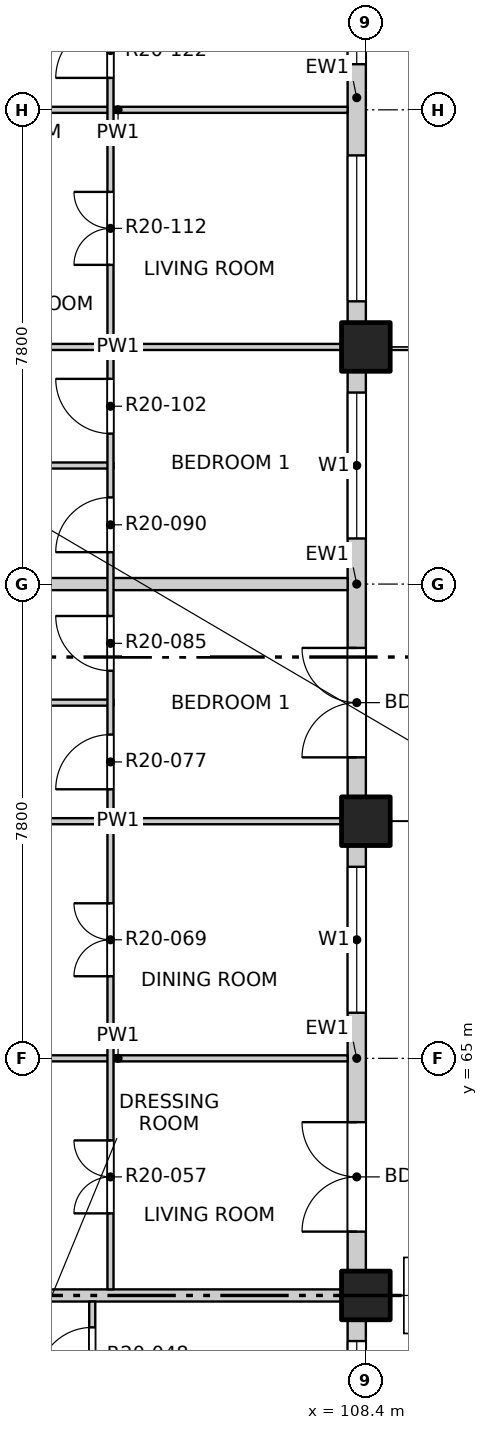
"""IFC4 building model, lengths in metres.
Left out: names, types, materials, properties, quantities, classifications, styles, units other than length and angle.
Written with IfcOpenShell. Run it as: python <this file> out.ifc"""

import sys

from ifc_helpers import new_model, si_unit, direction, frame, frame_2d, origin, origin_2d, place, context, subcontext, project, spatial, rectangle, extrude, element, fill, save


model = new_model("IFC4")
c1 = context("Model", 3, precision=1e-05, world=origin(), true_north=direction((0.0, 1.0)))
c2 = subcontext(c1, "Body", "Model", "MODEL_VIEW")
j1 = project(units=[si_unit("LENGTHUNIT", "METRE"), si_unit("PLANEANGLEUNIT", "RADIAN")], contexts=[c1])
p1 = place(None, origin())
s1 = spatial("IfcSite", under=j1, at=p1, CompositionType="ELEMENT")
p2 = place(p1, origin())
s2 = spatial("IfcBuilding", under=s1, at=p2, CompositionType="ELEMENT")
p3 = place(p2, frame((0.0, 0.0, 210.9)))
s3 = spatial("IfcBuildingStorey", under=s2, at=p3, CompositionType="ELEMENT", Elevation=210.9)
for number, where, z_axis, x_axis in (
    (1, (108.4, 61.1, -0.25), (0.0, 0.0, 1.0), (1.0, 0.0, 0.0)),
    (2, (108.4, 68.9, -0.25), (0.0, 0.0, 1.0), (1.0, 0.0, 0.0)),
    (3, (108.4, 76.7, -0.25), (0.0, 0.0, 1.0), (1.0, 0.0, 0.0)),
):
    element("IfcColumn", number, at=place(p3, frame(where, z_axis=z_axis, x_axis=x_axis)), inside=s3, PredefinedType="COLUMN", context=c2, shape_type="SweptSolid", body=[
        extrude(rectangle(XDim=0.8, YDim=0.8, at=origin_2d()), origin(), (0.0, 0.0, 1.0), 3.4),
    ])
p4 = place(p3, frame((108.25, 53.7, 0.0), z_axis=(0.0, 0.0, 1.0), x_axis=(0.0, 1.0, 0.0)))
e4 = element("IfcWall", 4, at=p4, inside=s3, PredefinedType="SOLIDWALL", context=c2, shape_type="SweptSolid", body=[
    extrude(rectangle(XDim=7.0, YDim=0.3, at=frame_2d((3.5, 0.0))), origin(), (0.0, 0.0, 1.0), 2.7),
])
p5 = place(p4, frame((0.65, 0.0, 0.0)))
e5 = element("IfcOpeningElement", 5, at=p5, cuts=e4, PredefinedType="OPENING", context=c2, shape_type="SweptSolid", body=[
    extrude(rectangle(XDim=1.8, YDim=2.4, at=frame_2d((0.9, 1.2))), frame((0.0, 0.16, 0.0), z_axis=(0.0, -1.0, 0.0), x_axis=(1.0, 0.0, 0.0)), (0.0, 0.0, 1.0), 0.32),
])
p6 = place(p4, frame((4.25, 0.0, 0.9)))
e6 = element("IfcOpeningElement", 6, at=p6, cuts=e4, PredefinedType="OPENING", context=c2, shape_type="SweptSolid", body=[
    extrude(rectangle(XDim=2.4, YDim=1.8, at=frame_2d((1.2, 0.9))), frame((0.0, 0.16, 0.0), z_axis=(0.0, -1.0, 0.0), x_axis=(1.0, 0.0, 0.0)), (0.0, 0.0, 1.0), 0.32),
])
p7 = place(p3, frame((108.25, 61.5, 0.0), z_axis=(0.0, 0.0, 1.0), x_axis=(0.0, 1.0, 0.0)))
e7 = element("IfcWall", 7, at=p7, inside=s3, PredefinedType="SOLIDWALL", context=c2, shape_type="SweptSolid", body=[
    extrude(rectangle(XDim=7.0, YDim=0.3, at=frame_2d((3.5, 0.0))), origin(), (0.0, 0.0, 1.0), 2.7),
])
p8 = place(p7, frame((0.65, 0.0, 0.0)))
e8 = element("IfcOpeningElement", 8, at=p8, cuts=e7, PredefinedType="OPENING", context=c2, shape_type="SweptSolid", body=[
    extrude(rectangle(XDim=1.8, YDim=2.4, at=frame_2d((0.9, 1.2))), frame((0.0, 0.16, 0.0), z_axis=(0.0, -1.0, 0.0), x_axis=(1.0, 0.0, 0.0)), (0.0, 0.0, 1.0), 0.32),
])
p9 = place(p7, frame((4.25, 0.0, 0.9)))
e9 = element("IfcOpeningElement", 9, at=p9, cuts=e7, PredefinedType="OPENING", context=c2, shape_type="SweptSolid", body=[
    extrude(rectangle(XDim=2.4, YDim=1.8, at=frame_2d((1.2, 0.9))), frame((0.0, 0.16, 0.0), z_axis=(0.0, -1.0, 0.0), x_axis=(1.0, 0.0, 0.0)), (0.0, 0.0, 1.0), 0.32),
])
p10 = place(p3, frame((108.25, 69.3, 0.0), z_axis=(0.0, 0.0, 1.0), x_axis=(0.0, 1.0, 0.0)))
e10 = element("IfcWall", 10, at=p10, inside=s3, PredefinedType="SOLIDWALL", context=c2, shape_type="SweptSolid", body=[
    extrude(rectangle(XDim=7.0, YDim=0.3, at=frame_2d((3.5, 0.0))), origin(), (0.0, 0.0, 1.0), 2.7),
])
p11 = place(p10, frame((0.65, 0.0, 0.0)))
e11 = element("IfcOpeningElement", 11, at=p11, cuts=e10, PredefinedType="OPENING", context=c2, shape_type="SweptSolid", body=[
    extrude(rectangle(XDim=1.8, YDim=2.4, at=frame_2d((0.9, 1.2))), frame((0.0, 0.16, 0.0), z_axis=(0.0, -1.0, 0.0), x_axis=(1.0, 0.0, 0.0)), (0.0, 0.0, 1.0), 0.32),
])
p12 = place(p10, frame((4.25, 0.0, 0.9)))
e12 = element("IfcOpeningElement", 12, at=p12, cuts=e10, PredefinedType="OPENING", context=c2, shape_type="SweptSolid", body=[
    extrude(rectangle(XDim=2.4, YDim=1.8, at=frame_2d((1.2, 0.9))), frame((0.0, 0.16, 0.0), z_axis=(0.0, -1.0, 0.0), x_axis=(1.0, 0.0, 0.0)), (0.0, 0.0, 1.0), 0.32),
])
p13 = place(p3, frame((108.25, 77.1, 0.0), z_axis=(0.0, 0.0, 1.0), x_axis=(0.0, 1.0, 0.0)))
e13 = element("IfcWall", 13, at=p13, inside=s3, PredefinedType="SOLIDWALL", context=c2, shape_type="SweptSolid", body=[
    extrude(rectangle(XDim=7.4, YDim=0.3, at=frame_2d((3.7, 0.0))), origin(), (0.0, 0.0, 1.0), 2.7),
])
p14 = place(p13, frame((0.35, 0.0, 0.9)))
e14 = element("IfcOpeningElement", 14, at=p14, cuts=e13, PredefinedType="OPENING", context=c2, shape_type="SweptSolid", body=[
    extrude(rectangle(XDim=2.4, YDim=1.8, at=frame_2d((1.2, 0.9))), frame((0.0, 0.16, 0.0), z_axis=(0.0, -1.0, 0.0), x_axis=(1.0, 0.0, 0.0)), (0.0, 0.0, 1.0), 0.32),
])
p15 = place(p13, frame((4.25, 0.0, 0.9)))
e15 = element("IfcOpeningElement", 15, at=p15, cuts=e13, PredefinedType="OPENING", context=c2, shape_type="SweptSolid", body=[
    extrude(rectangle(XDim=2.4, YDim=1.8, at=frame_2d((1.2, 0.9))), frame((0.0, 0.16, 0.0), z_axis=(0.0, -1.0, 0.0), x_axis=(1.0, 0.0, 0.0)), (0.0, 0.0, 1.0), 0.32),
])
p16 = place(p3, frame((96.6, 61.1, 0.0), z_axis=(0.0, 0.0, 1.0), x_axis=(1.0, 0.0, 0.0)))
e16 = element("IfcWall", 16, at=p16, inside=s3, PredefinedType="PARTITIONING", context=c2, shape_type="SweptSolid", body=[
    extrude(rectangle(XDim=11.5, YDim=0.2, at=frame_2d((5.75, 0.0))), origin(), (0.0, 0.0, 1.0), 2.55),
])
p17 = place(p3, frame((100.55, 65.0, 0.0), z_axis=(0.0, 0.0, 1.0), x_axis=(1.0, 0.0, 0.0)))
e17 = element("IfcWall", 17, at=p17, inside=s3, PredefinedType="PARTITIONING", context=c2, shape_type="SweptSolid", body=[
    extrude(rectangle(XDim=7.55, YDim=0.1, at=frame_2d((3.775, 0.0))), origin(), (0.0, 0.0, 1.0), 3.15),
])
p18 = place(p3, frame((100.55, 68.9, 0.0), z_axis=(0.0, 0.0, 1.0), x_axis=(1.0, 0.0, 0.0)))
e18 = element("IfcWall", 18, at=p18, inside=s3, PredefinedType="PARTITIONING", context=c2, shape_type="SweptSolid", body=[
    extrude(rectangle(XDim=7.55, YDim=0.1, at=frame_2d((3.775, 0.0))), origin(), (0.0, 0.0, 1.0), 2.55),
])
p19 = place(p3, frame((100.55, 70.85, 0.0), z_axis=(0.0, 0.0, 1.0), x_axis=(1.0, 0.0, 0.0)))
e19 = element("IfcWall", 19, at=p19, inside=s3, PredefinedType="PARTITIONING", context=c2, shape_type="SweptSolid", body=[
    extrude(rectangle(XDim=3.7, YDim=0.1, at=frame_2d((1.85, 0.0))), origin(), (0.0, 0.0, 1.0), 3.15),
])
p20 = place(p3, frame((96.6, 72.8, 0.0), z_axis=(0.0, 0.0, 1.0), x_axis=(1.0, 0.0, 0.0)))
e20 = element("IfcWall", 20, at=p20, inside=s3, PredefinedType="PARTITIONING", context=c2, shape_type="SweptSolid", body=[
    extrude(rectangle(XDim=11.5, YDim=0.2, at=frame_2d((5.75, 0.0))), origin(), (0.0, 0.0, 1.0), 3.15),
])
p21 = place(p3, frame((100.55, 74.75, 0.0), z_axis=(0.0, 0.0, 1.0), x_axis=(1.0, 0.0, 0.0)))
e21 = element("IfcWall", 21, at=p21, inside=s3, PredefinedType="PARTITIONING", context=c2, shape_type="SweptSolid", body=[
    extrude(rectangle(XDim=3.7, YDim=0.1, at=frame_2d((1.85, 0.0))), origin(), (0.0, 0.0, 1.0), 3.15),
])
p22 = place(p3, frame((100.55, 76.7, 0.0), z_axis=(0.0, 0.0, 1.0), x_axis=(1.0, 0.0, 0.0)))
e22 = element("IfcWall", 22, at=p22, inside=s3, PredefinedType="PARTITIONING", context=c2, shape_type="SweptSolid", body=[
    extrude(rectangle(XDim=7.55, YDim=0.1, at=frame_2d((3.775, 0.0))), origin(), (0.0, 0.0, 1.0), 2.55),
])
p23 = place(p3, frame((100.55, 80.6, 0.0), z_axis=(0.0, 0.0, 1.0), x_axis=(1.0, 0.0, 0.0)))
e23 = element("IfcWall", 23, at=p23, inside=s3, PredefinedType="PARTITIONING", context=c2, shape_type="SweptSolid", body=[
    extrude(rectangle(XDim=7.55, YDim=0.1, at=frame_2d((3.775, 0.0))), origin(), (0.0, 0.0, 1.0), 3.15),
])
p24 = place(p3, frame((103.9, 41.9, 0.0), z_axis=(0.0, 0.0, 1.0), x_axis=(0.0, 1.0, 0.0)))
e24 = element("IfcWall", 24, at=p24, inside=s3, PredefinedType="PARTITIONING", context=c2, shape_type="SweptSolid", body=[
    extrude(rectangle(XDim=19.1, YDim=0.1, at=frame_2d((9.55, 0.0))), origin(), (0.0, 0.0, 1.0), 3.15),
])
p25 = place(p24, frame((1.05, 0.0, 0.0)))
e25 = element("IfcOpeningElement", 25, at=p25, cuts=e24, PredefinedType="OPENING", context=c2, shape_type="SweptSolid", body=[
    extrude(rectangle(XDim=1.2, YDim=2.1, at=frame_2d((0.6, 1.05))), frame((0.0, 0.06, 0.0), z_axis=(0.0, -1.0, 0.0), x_axis=(1.0, 0.0, 0.0)), (0.0, 0.0, 1.0), 0.12),
])
p26 = place(p24, frame((4.125, 0.0, 0.0)))
e26 = element("IfcOpeningElement", 26, at=p26, cuts=e24, PredefinedType="OPENING", context=c2, shape_type="SweptSolid", body=[
    extrude(rectangle(XDim=0.9, YDim=2.1, at=frame_2d((0.45, 1.05))), frame((0.0, 0.06, 0.0), z_axis=(0.0, -1.0, 0.0), x_axis=(1.0, 0.0, 0.0)), (0.0, 0.0, 1.0), 0.12),
])
p27 = place(p24, frame((6.075, 0.0, 0.0)))
e27 = element("IfcOpeningElement", 27, at=p27, cuts=e24, PredefinedType="OPENING", context=c2, shape_type="SweptSolid", body=[
    extrude(rectangle(XDim=0.9, YDim=2.1, at=frame_2d((0.45, 1.05))), frame((0.0, 0.06, 0.0), z_axis=(0.0, -1.0, 0.0), x_axis=(1.0, 0.0, 0.0)), (0.0, 0.0, 1.0), 0.12),
])
p28 = place(p24, frame((8.85, 0.0, 0.0)))
e28 = element("IfcOpeningElement", 28, at=p28, cuts=e24, PredefinedType="OPENING", context=c2, shape_type="SweptSolid", body=[
    extrude(rectangle(XDim=1.2, YDim=2.1, at=frame_2d((0.6, 1.05))), frame((0.0, 0.06, 0.0), z_axis=(0.0, -1.0, 0.0), x_axis=(1.0, 0.0, 0.0)), (0.0, 0.0, 1.0), 0.12),
])
p29 = place(p24, frame((11.925, 0.0, 0.0)))
e29 = element("IfcOpeningElement", 29, at=p29, cuts=e24, PredefinedType="OPENING", context=c2, shape_type="SweptSolid", body=[
    extrude(rectangle(XDim=0.9, YDim=2.1, at=frame_2d((0.45, 1.05))), frame((0.0, 0.06, 0.0), z_axis=(0.0, -1.0, 0.0), x_axis=(1.0, 0.0, 0.0)), (0.0, 0.0, 1.0), 0.12),
])
p30 = place(p24, frame((13.875, 0.0, 0.0)))
e30 = element("IfcOpeningElement", 30, at=p30, cuts=e24, PredefinedType="OPENING", context=c2, shape_type="SweptSolid", body=[
    extrude(rectangle(XDim=0.9, YDim=2.1, at=frame_2d((0.45, 1.05))), frame((0.0, 0.06, 0.0), z_axis=(0.0, -1.0, 0.0), x_axis=(1.0, 0.0, 0.0)), (0.0, 0.0, 1.0), 0.12),
])
p31 = place(p24, frame((15.825, 0.0, 0.0)))
e31 = element("IfcOpeningElement", 31, at=p31, cuts=e24, PredefinedType="OPENING", context=c2, shape_type="SweptSolid", body=[
    extrude(rectangle(XDim=0.9, YDim=2.1, at=frame_2d((0.45, 1.05))), frame((0.0, 0.06, 0.0), z_axis=(0.0, -1.0, 0.0), x_axis=(1.0, 0.0, 0.0)), (0.0, 0.0, 1.0), 0.12),
])
p32 = place(p24, frame((17.775, 0.0, 0.0)))
e32 = element("IfcOpeningElement", 32, at=p32, cuts=e24, PredefinedType="OPENING", context=c2, shape_type="SweptSolid", body=[
    extrude(rectangle(XDim=0.9, YDim=2.1, at=frame_2d((0.45, 1.05))), frame((0.0, 0.06, 0.0), z_axis=(0.0, -1.0, 0.0), x_axis=(1.0, 0.0, 0.0)), (0.0, 0.0, 1.0), 0.12),
])
p33 = place(p3, frame((104.2, 61.2, 0.0), z_axis=(0.0, 0.0, 1.0), x_axis=(0.0, 1.0, 0.0)))
e33 = element("IfcWall", 33, at=p33, inside=s3, PredefinedType="PARTITIONING", context=c2, shape_type="SweptSolid", body=[
    extrude(rectangle(XDim=26.9, YDim=0.1, at=frame_2d((13.45, 0.0))), origin(), (0.0, 0.0, 1.0), 3.15),
])
p34 = place(p33, frame((1.25, 0.0, 0.0)))
e34 = element("IfcOpeningElement", 34, at=p34, cuts=e33, PredefinedType="OPENING", context=c2, shape_type="SweptSolid", body=[
    extrude(rectangle(XDim=1.2, YDim=2.1, at=frame_2d((0.6, 1.05))), frame((0.0, 0.06, 0.0), z_axis=(0.0, -1.0, 0.0), x_axis=(1.0, 0.0, 0.0)), (0.0, 0.0, 1.0), 0.12),
])
p35 = place(p33, frame((5.15, 0.0, 0.0)))
e35 = element("IfcOpeningElement", 35, at=p35, cuts=e33, PredefinedType="OPENING", context=c2, shape_type="SweptSolid", body=[
    extrude(rectangle(XDim=1.2, YDim=2.1, at=frame_2d((0.6, 1.05))), frame((0.0, 0.06, 0.0), z_axis=(0.0, -1.0, 0.0), x_axis=(1.0, 0.0, 0.0)), (0.0, 0.0, 1.0), 0.12),
])
p36 = place(p33, frame((8.225, 0.0, 0.0)))
e36 = element("IfcOpeningElement", 36, at=p36, cuts=e33, PredefinedType="OPENING", context=c2, shape_type="SweptSolid", body=[
    extrude(rectangle(XDim=0.9, YDim=2.1, at=frame_2d((0.45, 1.05))), frame((0.0, 0.06, 0.0), z_axis=(0.0, -1.0, 0.0), x_axis=(1.0, 0.0, 0.0)), (0.0, 0.0, 1.0), 0.12),
])
p37 = place(p33, frame((10.175, 0.0, 0.0)))
e37 = element("IfcOpeningElement", 37, at=p37, cuts=e33, PredefinedType="OPENING", context=c2, shape_type="SweptSolid", body=[
    extrude(rectangle(XDim=0.9, YDim=2.1, at=frame_2d((0.45, 1.05))), frame((0.0, 0.06, 0.0), z_axis=(0.0, -1.0, 0.0), x_axis=(1.0, 0.0, 0.0)), (0.0, 0.0, 1.0), 0.12),
])
p38 = place(p33, frame((12.125, 0.0, 0.0)))
e38 = element("IfcOpeningElement", 38, at=p38, cuts=e33, PredefinedType="OPENING", context=c2, shape_type="SweptSolid", body=[
    extrude(rectangle(XDim=0.9, YDim=2.1, at=frame_2d((0.45, 1.05))), frame((0.0, 0.06, 0.0), z_axis=(0.0, -1.0, 0.0), x_axis=(1.0, 0.0, 0.0)), (0.0, 0.0, 1.0), 0.12),
])
p39 = place(p33, frame((14.075, 0.0, 0.0)))
e39 = element("IfcOpeningElement", 39, at=p39, cuts=e33, PredefinedType="OPENING", context=c2, shape_type="SweptSolid", body=[
    extrude(rectangle(XDim=0.9, YDim=2.1, at=frame_2d((0.45, 1.05))), frame((0.0, 0.06, 0.0), z_axis=(0.0, -1.0, 0.0), x_axis=(1.0, 0.0, 0.0)), (0.0, 0.0, 1.0), 0.12),
])
p40 = place(p33, frame((16.85, 0.0, 0.0)))
e40 = element("IfcOpeningElement", 40, at=p40, cuts=e33, PredefinedType="OPENING", context=c2, shape_type="SweptSolid", body=[
    extrude(rectangle(XDim=1.2, YDim=2.1, at=frame_2d((0.6, 1.05))), frame((0.0, 0.06, 0.0), z_axis=(0.0, -1.0, 0.0), x_axis=(1.0, 0.0, 0.0)), (0.0, 0.0, 1.0), 0.12),
])
p41 = place(p33, frame((19.925, 0.0, 0.0)))
e41 = element("IfcOpeningElement", 41, at=p41, cuts=e33, PredefinedType="OPENING", context=c2, shape_type="SweptSolid", body=[
    extrude(rectangle(XDim=0.9, YDim=2.1, at=frame_2d((0.45, 1.05))), frame((0.0, 0.06, 0.0), z_axis=(0.0, -1.0, 0.0), x_axis=(1.0, 0.0, 0.0)), (0.0, 0.0, 1.0), 0.12),
])
p42 = place(p33, frame((21.875, 0.0, 0.0)))
e42 = element("IfcOpeningElement", 42, at=p42, cuts=e33, PredefinedType="OPENING", context=c2, shape_type="SweptSolid", body=[
    extrude(rectangle(XDim=0.9, YDim=2.1, at=frame_2d((0.45, 1.05))), frame((0.0, 0.06, 0.0), z_axis=(0.0, -1.0, 0.0), x_axis=(1.0, 0.0, 0.0)), (0.0, 0.0, 1.0), 0.12),
])
p43 = place(p33, frame((24.65, 0.0, 0.0)))
e43 = element("IfcOpeningElement", 43, at=p43, cuts=e33, PredefinedType="OPENING", context=c2, shape_type="SweptSolid", body=[
    extrude(rectangle(XDim=1.2, YDim=2.1, at=frame_2d((0.6, 1.05))), frame((0.0, 0.06, 0.0), z_axis=(0.0, -1.0, 0.0), x_axis=(1.0, 0.0, 0.0)), (0.0, 0.0, 1.0), 0.12),
])
p44 = place(p6, origin())
e44 = element("IfcWindow", 44, at=p44, inside=s3, PartitioningType="DOUBLE_PANEL_VERTICAL", PredefinedType="WINDOW", context=c2, shape_type="SweptSolid", body=[
    extrude(rectangle(XDim=2.4, YDim=1.8, at=frame_2d((1.2, 0.9))), frame((0.0, 0.03, 0.0), z_axis=(0.0, -1.0, 0.0), x_axis=(1.0, 0.0, 0.0)), (0.0, 0.0, 1.0), 0.06),
])
fill(e6, e44)
p45 = place(p8, origin())
e45 = element("IfcDoor", 45, at=p45, inside=s3, OperationType="DOUBLE_DOOR_SINGLE_SWING", PredefinedType="DOOR", context=c2, shape_type="SweptSolid", body=[
    extrude(rectangle(XDim=1.8, YDim=2.4, at=frame_2d((0.9, 1.2))), frame((0.0, 0.025, 0.0), z_axis=(0.0, -1.0, 0.0), x_axis=(1.0, 0.0, 0.0)), (0.0, 0.0, 1.0), 0.05),
])
fill(e8, e45)
p46 = place(p9, origin())
e46 = element("IfcWindow", 46, at=p46, inside=s3, PartitioningType="DOUBLE_PANEL_VERTICAL", PredefinedType="WINDOW", context=c2, shape_type="SweptSolid", body=[
    extrude(rectangle(XDim=2.4, YDim=1.8, at=frame_2d((1.2, 0.9))), frame((0.0, 0.03, 0.0), z_axis=(0.0, -1.0, 0.0), x_axis=(1.0, 0.0, 0.0)), (0.0, 0.0, 1.0), 0.06),
])
fill(e9, e46)
p47 = place(p11, origin())
e47 = element("IfcDoor", 47, at=p47, inside=s3, OperationType="DOUBLE_DOOR_SINGLE_SWING", PredefinedType="DOOR", context=c2, shape_type="SweptSolid", body=[
    extrude(rectangle(XDim=1.8, YDim=2.4, at=frame_2d((0.9, 1.2))), frame((0.0, 0.025, 0.0), z_axis=(0.0, -1.0, 0.0), x_axis=(1.0, 0.0, 0.0)), (0.0, 0.0, 1.0), 0.05),
])
fill(e11, e47)
p48 = place(p12, origin())
e48 = element("IfcWindow", 48, at=p48, inside=s3, PartitioningType="DOUBLE_PANEL_VERTICAL", PredefinedType="WINDOW", context=c2, shape_type="SweptSolid", body=[
    extrude(rectangle(XDim=2.4, YDim=1.8, at=frame_2d((1.2, 0.9))), frame((0.0, 0.03, 0.0), z_axis=(0.0, -1.0, 0.0), x_axis=(1.0, 0.0, 0.0)), (0.0, 0.0, 1.0), 0.06),
])
fill(e12, e48)
p49 = place(p14, origin())
e49 = element("IfcWindow", 49, at=p49, inside=s3, PartitioningType="DOUBLE_PANEL_VERTICAL", PredefinedType="WINDOW", context=c2, shape_type="SweptSolid", body=[
    extrude(rectangle(XDim=2.4, YDim=1.8, at=frame_2d((1.2, 0.9))), frame((0.0, 0.03, 0.0), z_axis=(0.0, -1.0, 0.0), x_axis=(1.0, 0.0, 0.0)), (0.0, 0.0, 1.0), 0.06),
])
fill(e14, e49)
p50 = place(p15, origin())
e50 = element("IfcWindow", 50, at=p50, inside=s3, PartitioningType="DOUBLE_PANEL_VERTICAL", PredefinedType="WINDOW", context=c2, shape_type="SweptSolid", body=[
    extrude(rectangle(XDim=2.4, YDim=1.8, at=frame_2d((1.2, 0.9))), frame((0.0, 0.03, 0.0), z_axis=(0.0, -1.0, 0.0), x_axis=(1.0, 0.0, 0.0)), (0.0, 0.0, 1.0), 0.06),
])
fill(e15, e50)
p51 = place(p32, origin())
e51 = element("IfcDoor", 51, at=p51, inside=s3, OperationType="SINGLE_SWING_LEFT", PredefinedType="DOOR", context=c2, shape_type="SweptSolid", body=[
    extrude(rectangle(XDim=0.9, YDim=2.1, at=frame_2d((0.45, 1.05))), frame((0.0, 0.025, 0.0), z_axis=(0.0, -1.0, 0.0), x_axis=(1.0, 0.0, 0.0)), (0.0, 0.0, 1.0), 0.05),
])
fill(e32, e51)
p52 = place(p34, origin())
e52 = element("IfcDoor", 52, at=p52, inside=s3, OperationType="DOUBLE_DOOR_SINGLE_SWING", PredefinedType="DOOR", context=c2, shape_type="SweptSolid", body=[
    extrude(rectangle(XDim=1.2, YDim=2.1, at=frame_2d((0.6, 1.05))), frame((0.0, 0.025, 0.0), z_axis=(0.0, -1.0, 0.0), x_axis=(1.0, 0.0, 0.0)), (0.0, 0.0, 1.0), 0.05),
])
fill(e34, e52)
p53 = place(p35, origin())
e53 = element("IfcDoor", 53, at=p53, inside=s3, OperationType="DOUBLE_DOOR_SINGLE_SWING", PredefinedType="DOOR", context=c2, shape_type="SweptSolid", body=[
    extrude(rectangle(XDim=1.2, YDim=2.1, at=frame_2d((0.6, 1.05))), frame((0.0, 0.025, 0.0), z_axis=(0.0, -1.0, 0.0), x_axis=(1.0, 0.0, 0.0)), (0.0, 0.0, 1.0), 0.05),
])
fill(e35, e53)
p54 = place(p36, origin())
e54 = element("IfcDoor", 54, at=p54, inside=s3, OperationType="SINGLE_SWING_LEFT", PredefinedType="DOOR", context=c2, shape_type="SweptSolid", body=[
    extrude(rectangle(XDim=0.9, YDim=2.1, at=frame_2d((0.45, 1.05))), frame((0.0, 0.025, 0.0), z_axis=(0.0, -1.0, 0.0), x_axis=(1.0, 0.0, 0.0)), (0.0, 0.0, 1.0), 0.05),
])
fill(e36, e54)
p55 = place(p37, origin())
e55 = element("IfcDoor", 55, at=p55, inside=s3, OperationType="SINGLE_SWING_RIGHT", PredefinedType="DOOR", context=c2, shape_type="SweptSolid", body=[
    extrude(rectangle(XDim=0.9, YDim=2.1, at=frame_2d((0.45, 1.05))), frame((0.0, 0.025, 0.0), z_axis=(0.0, -1.0, 0.0), x_axis=(1.0, 0.0, 0.0)), (0.0, 0.0, 1.0), 0.05),
])
fill(e37, e55)
p56 = place(p38, origin())
e56 = element("IfcDoor", 56, at=p56, inside=s3, OperationType="SINGLE_SWING_LEFT", PredefinedType="DOOR", context=c2, shape_type="SweptSolid", body=[
    extrude(rectangle(XDim=0.9, YDim=2.1, at=frame_2d((0.45, 1.05))), frame((0.0, 0.025, 0.0), z_axis=(0.0, -1.0, 0.0), x_axis=(1.0, 0.0, 0.0)), (0.0, 0.0, 1.0), 0.05),
])
fill(e38, e56)
p57 = place(p39, origin())
e57 = element("IfcDoor", 57, at=p57, inside=s3, OperationType="SINGLE_SWING_RIGHT", PredefinedType="DOOR", context=c2, shape_type="SweptSolid", body=[
    extrude(rectangle(XDim=0.9, YDim=2.1, at=frame_2d((0.45, 1.05))), frame((0.0, 0.025, 0.0), z_axis=(0.0, -1.0, 0.0), x_axis=(1.0, 0.0, 0.0)), (0.0, 0.0, 1.0), 0.05),
])
fill(e39, e57)
p58 = place(p40, origin())
e58 = element("IfcDoor", 58, at=p58, inside=s3, OperationType="DOUBLE_DOOR_SINGLE_SWING", PredefinedType="DOOR", context=c2, shape_type="SweptSolid", body=[
    extrude(rectangle(XDim=1.2, YDim=2.1, at=frame_2d((0.6, 1.05))), frame((0.0, 0.025, 0.0), z_axis=(0.0, -1.0, 0.0), x_axis=(1.0, 0.0, 0.0)), (0.0, 0.0, 1.0), 0.05),
])
fill(e40, e58)
p59 = place(p41, origin())
e59 = element("IfcDoor", 59, at=p59, inside=s3, OperationType="SINGLE_SWING_LEFT", PredefinedType="DOOR", context=c2, shape_type="SweptSolid", body=[
    extrude(rectangle(XDim=0.9, YDim=2.1, at=frame_2d((0.45, 1.05))), frame((0.0, 0.025, 0.0), z_axis=(0.0, -1.0, 0.0), x_axis=(1.0, 0.0, 0.0)), (0.0, 0.0, 1.0), 0.05),
])
fill(e41, e59)
save(model, sys.argv[1])
